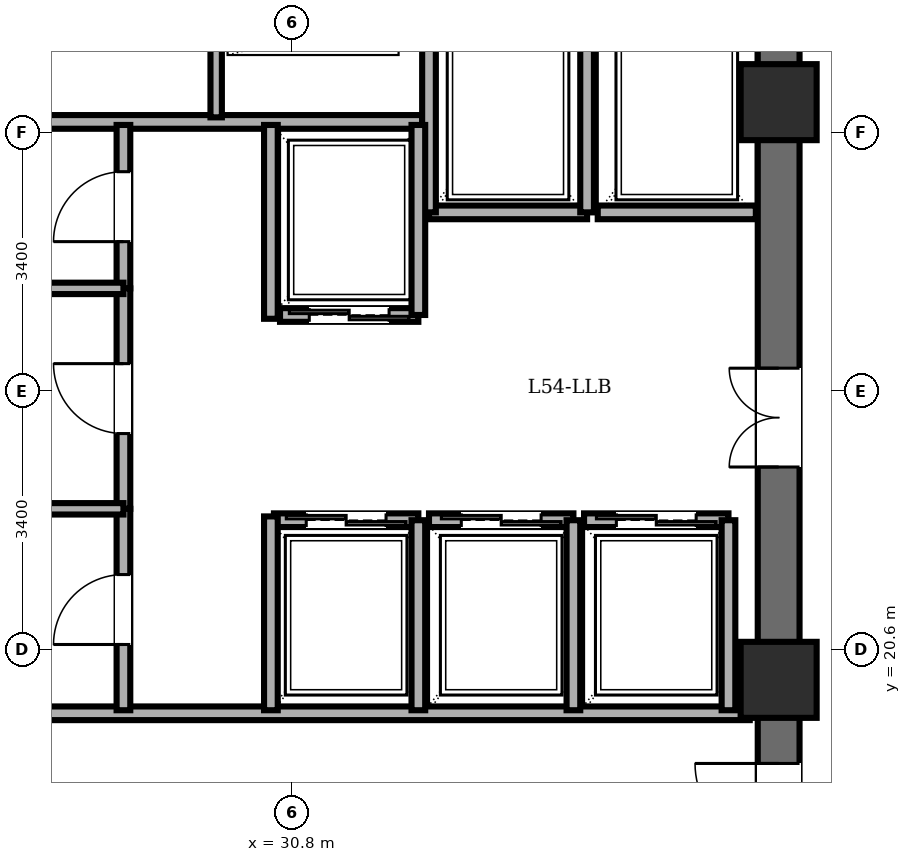
"""IFC4 building model, lengths in metres.
Left out: names, types, materials, properties, quantities, classifications, styles, units other than length and angle.
Written with IfcOpenShell. Run it as: python <this file> out.ifc"""

import sys

from ifc_helpers import new_model, si_unit, direction, frame, frame_2d, origin, origin_2d, place, context, subcontext, project, spatial, rectangle, extrude, element, fill, save


model = new_model("IFC4")
c1 = context("Model", 3, precision=1e-05, world=origin(), true_north=direction((0.0, 1.0)))
c2 = subcontext(c1, "Body", "Model", "MODEL_VIEW")
j1 = project(units=[si_unit("LENGTHUNIT", "METRE"), si_unit("PLANEANGLEUNIT", "RADIAN")], contexts=[c1])
p1 = place(None, origin())
s1 = spatial("IfcSite", under=j1, at=p1, CompositionType="ELEMENT")
p2 = place(p1, origin())
s2 = spatial("IfcBuilding", under=s1, at=p2, CompositionType="ELEMENT")
p3 = place(p2, frame((0.0, 0.0, 208.5)))
s3 = spatial("IfcBuildingStorey", under=s2, at=p3, CompositionType="ELEMENT", Elevation=208.5)
for number, where, z_axis, x_axis in (
    (1, (37.2, 20.2, 0.0), (0.0, 0.0, 1.0), (1.0, 0.0, 0.0)),
    (2, (37.2, 27.8, 0.0), (0.0, 0.0, 1.0), (1.0, 0.0, 0.0)),
):
    element("IfcColumn", number, at=place(p3, frame(where, z_axis=z_axis, x_axis=x_axis)), inside=s3, PredefinedType="COLUMN", context=c2, shape_type="SweptSolid", body=[
        extrude(rectangle(XDim=1.0, YDim=1.0, at=origin_2d()), origin(), (0.0, 0.0, 1.0), 3.6),
    ])
p4 = place(p3, frame((37.2, 14.4, 0.0), z_axis=(0.0, 0.0, 1.0), x_axis=(0.0, 1.0, 0.0)))
e3 = element("IfcWall", 3, at=p4, inside=s3, PredefinedType="SHEAR", context=c2, shape_type="SweptSolid", body=[
    extrude(rectangle(XDim=19.2, YDim=0.55, at=frame_2d((9.6, 0.0))), origin(), (0.0, 0.0, 1.0), 3.4),
])
p5 = place(p4, frame((15.8, 0.0, 0.0)))
e4 = element("IfcOpeningElement", 4, at=p5, cuts=e3, PredefinedType="OPENING", context=c2, shape_type="SweptSolid", body=[
    extrude(rectangle(XDim=1.15, YDim=2.15, at=frame_2d((0.575, 1.075))), frame((0.0, 0.285, 0.0), z_axis=(0.0, -1.0, 0.0), x_axis=(1.0, 0.0, 0.0)), (0.0, 0.0, 1.0), 0.57),
])
p6 = place(p4, frame((3.6, 0.0, 0.0)))
e5 = element("IfcOpeningElement", 5, at=p6, cuts=e3, PredefinedType="OPENING", context=c2, shape_type="SweptSolid", body=[
    extrude(rectangle(XDim=1.1, YDim=2.15, at=frame_2d((0.55, 1.075))), frame((0.0, 0.285, 0.0), z_axis=(0.0, -1.0, 0.0), x_axis=(1.0, 0.0, 0.0)), (0.0, 0.0, 1.0), 0.57),
])
p7 = place(p4, frame((8.6, 0.0, 0.0)))
e6 = element("IfcOpeningElement", 6, at=p7, cuts=e3, PredefinedType="OPENING", context=c2, shape_type="SweptSolid", body=[
    extrude(rectangle(XDim=1.3, YDim=2.2, at=frame_2d((0.65, 1.1))), frame((0.0, 0.285, 0.0), z_axis=(0.0, -1.0, 0.0), x_axis=(1.0, 0.0, 0.0)), (0.0, 0.0, 1.0), 0.57),
])
p8 = place(p3, frame((21.95, 27.54, 0.0), z_axis=(0.0, 0.0, 1.0), x_axis=(1.0, 0.0, 0.0)))
e7 = element("IfcWall", 7, at=p8, inside=s3, PredefinedType="PARTITIONING", context=c2, shape_type="SweptSolid", body=[
    extrude(rectangle(XDim=10.56, YDim=0.18, at=frame_2d((5.28, 0.0))), origin(), (0.0, 0.0, 1.0), 3.4),
])
p9 = place(p3, frame((29.8, 27.6, 0.0), z_axis=(0.0, 0.0, 1.0), x_axis=(0.0, 1.0, 0.0)))
e8 = element("IfcWall", 8, at=p9, inside=s3, PredefinedType="PARTITIONING", context=c2, shape_type="SweptSolid", body=[
    extrude(rectangle(XDim=1.52, YDim=0.15, at=frame_2d((0.76, 0.0))), origin(), (0.0, 0.0, 1.0), 3.4),
])
p10 = place(p3, frame((21.95, 19.76, 0.0), z_axis=(0.0, 0.0, 1.0), x_axis=(1.0, 0.0, 0.0)))
e9 = element("IfcWall", 9, at=p10, inside=s3, PredefinedType="PARTITIONING", context=c2, shape_type="SweptSolid", body=[
    extrude(rectangle(XDim=14.87, YDim=0.18, at=frame_2d((7.435, 0.0))), origin(), (0.0, 0.0, 1.0), 3.4),
])
p11 = place(p3, frame((34.68, 26.35, 0.0), z_axis=(0.0, 0.0, 1.0), x_axis=(-1.0, 0.0, 0.0)))
e10 = element("IfcWall", 10, at=p11, inside=s3, PredefinedType="PARTITIONING", context=c2, shape_type="SweptSolid", body=[
    extrude(rectangle(XDim=2.08, YDim=0.18, at=frame_2d((1.04, 0.0))), origin(), (0.0, 0.0, 1.0), 3.4),
])
for number, where, z_axis, x_axis in (
    (11, (34.68, 26.35, 0.0), (0.0, 0.0, 1.0), (0.0, 1.0, 0.0)),
    (12, (32.6, 29.08, 0.0), (0.0, 0.0, 1.0), (0.0, -1.0, 0.0)),
):
    element("IfcWall", number, at=place(p3, frame(where, z_axis=z_axis, x_axis=x_axis)), inside=s3, PredefinedType="PARTITIONING", context=c2, shape_type="SweptSolid", body=[
        extrude(rectangle(XDim=2.73, YDim=0.18, at=frame_2d((1.365, 0.0))), origin(), (0.0, 0.0, 1.0), 3.4),
    ])
p12 = place(p3, frame((36.9, 26.35, 0.0), z_axis=(0.0, 0.0, 1.0), x_axis=(-1.0, 0.0, 0.0)))
e13 = element("IfcWall", 13, at=p12, inside=s3, PredefinedType="PARTITIONING", context=c2, shape_type="SweptSolid", body=[
    extrude(rectangle(XDim=2.08, YDim=0.18, at=frame_2d((1.04, 0.0))), origin(), (0.0, 0.0, 1.0), 3.4),
])
p13 = place(p3, frame((32.46, 25.0, 0.0), z_axis=(0.0, 0.0, 1.0), x_axis=(-1.0, 0.0, 0.0)))
e14 = element("IfcWall", 14, at=p13, inside=s3, PredefinedType="PARTITIONING", context=c2, shape_type="SweptSolid", body=[
    extrude(rectangle(XDim=1.82, YDim=0.18, at=frame_2d((0.91, 0.0))), origin(), (0.0, 0.0, 1.0), 3.4),
])
p14 = place(p13, frame((0.385, 0.0, 0.0)))
e15 = element("IfcOpeningElement", 15, at=p14, cuts=e14, PredefinedType="OPENING", context=c2, shape_type="SweptSolid", body=[
    extrude(rectangle(XDim=1.05, YDim=2.2, at=frame_2d((0.525, 1.1))), frame((0.0, 0.1, 0.0), z_axis=(0.0, -1.0, 0.0), x_axis=(1.0, 0.0, 0.0)), (0.0, 0.0, 1.0), 0.2),
])
p15 = place(p3, frame((32.46, 25.0, 0.0), z_axis=(0.0, 0.0, 1.0), x_axis=(0.0, 1.0, 0.0)))
e16 = element("IfcWall", 16, at=p15, inside=s3, PredefinedType="PARTITIONING", context=c2, shape_type="SweptSolid", body=[
    extrude(rectangle(XDim=2.5, YDim=0.18, at=frame_2d((1.25, 0.0))), origin(), (0.0, 0.0, 1.0), 3.4),
])
p16 = place(p3, frame((30.56, 22.3, 0.0), z_axis=(0.0, 0.0, 1.0), x_axis=(1.0, 0.0, 0.0)))
e17 = element("IfcWall", 17, at=p16, inside=s3, PredefinedType="PARTITIONING", context=c2, shape_type="SweptSolid", body=[
    extrude(rectangle(XDim=1.9, YDim=0.18, at=frame_2d((0.95, 0.0))), origin(), (0.0, 0.0, 1.0), 3.4),
])
p17 = place(p16, frame((0.425, 0.0, 0.0)))
e18 = element("IfcOpeningElement", 18, at=p17, cuts=e17, PredefinedType="OPENING", context=c2, shape_type="SweptSolid", body=[
    extrude(rectangle(XDim=1.05, YDim=2.2, at=frame_2d((0.525, 1.1))), frame((0.0, 0.1, 0.0), z_axis=(0.0, -1.0, 0.0), x_axis=(1.0, 0.0, 0.0)), (0.0, 0.0, 1.0), 0.2),
])
p18 = place(p3, frame((32.46, 19.8, 0.0), z_axis=(0.0, 0.0, 1.0), x_axis=(0.0, 1.0, 0.0)))
e19 = element("IfcWall", 19, at=p18, inside=s3, PredefinedType="PARTITIONING", context=c2, shape_type="SweptSolid", body=[
    extrude(rectangle(XDim=2.5, YDim=0.18, at=frame_2d((1.25, 0.0))), origin(), (0.0, 0.0, 1.0), 3.4),
])
p19 = place(p3, frame((32.6, 22.3, 0.0), z_axis=(0.0, 0.0, 1.0), x_axis=(1.0, 0.0, 0.0)))
e20 = element("IfcWall", 20, at=p19, inside=s3, PredefinedType="PARTITIONING", context=c2, shape_type="SweptSolid", body=[
    extrude(rectangle(XDim=1.9, YDim=0.18, at=frame_2d((0.95, 0.0))), origin(), (0.0, 0.0, 1.0), 3.4),
])
p20 = place(p19, frame((0.425, 0.0, 0.0)))
e21 = element("IfcOpeningElement", 21, at=p20, cuts=e20, PredefinedType="OPENING", context=c2, shape_type="SweptSolid", body=[
    extrude(rectangle(XDim=1.05, YDim=2.2, at=frame_2d((0.525, 1.1))), frame((0.0, 0.1, 0.0), z_axis=(0.0, -1.0, 0.0), x_axis=(1.0, 0.0, 0.0)), (0.0, 0.0, 1.0), 0.2),
])
p21 = place(p3, frame((34.5, 19.8, 0.0), z_axis=(0.0, 0.0, 1.0), x_axis=(0.0, 1.0, 0.0)))
e22 = element("IfcWall", 22, at=p21, inside=s3, PredefinedType="PARTITIONING", context=c2, shape_type="SweptSolid", body=[
    extrude(rectangle(XDim=2.5, YDim=0.18, at=frame_2d((1.25, 0.0))), origin(), (0.0, 0.0, 1.0), 3.4),
])
p22 = place(p3, frame((34.64, 22.3, 0.0), z_axis=(0.0, 0.0, 1.0), x_axis=(1.0, 0.0, 0.0)))
e23 = element("IfcWall", 23, at=p22, inside=s3, PredefinedType="PARTITIONING", context=c2, shape_type="SweptSolid", body=[
    extrude(rectangle(XDim=1.9, YDim=0.18, at=frame_2d((0.95, 0.0))), origin(), (0.0, 0.0, 1.0), 3.4),
])
p23 = place(p22, frame((0.425, 0.0, 0.0)))
e24 = element("IfcOpeningElement", 24, at=p23, cuts=e23, PredefinedType="OPENING", context=c2, shape_type="SweptSolid", body=[
    extrude(rectangle(XDim=1.05, YDim=2.2, at=frame_2d((0.525, 1.1))), frame((0.0, 0.1, 0.0), z_axis=(0.0, -1.0, 0.0), x_axis=(1.0, 0.0, 0.0)), (0.0, 0.0, 1.0), 0.2),
])
p24 = place(p3, frame((36.54, 19.8, 0.0), z_axis=(0.0, 0.0, 1.0), x_axis=(0.0, 1.0, 0.0)))
e25 = element("IfcWall", 25, at=p24, inside=s3, PredefinedType="PARTITIONING", context=c2, shape_type="SweptSolid", body=[
    extrude(rectangle(XDim=2.5, YDim=0.18, at=frame_2d((1.25, 0.0))), origin(), (0.0, 0.0, 1.0), 3.4),
])
for number, where, z_axis, x_axis in (
    (26, (30.52, 24.95, 0.0), (0.0, 0.0, 1.0), (0.0, 1.0, 0.0)),
    (27, (30.52, 19.8, 0.0), (0.0, 0.0, 1.0), (0.0, 1.0, 0.0)),
):
    element("IfcWall", number, at=place(p3, frame(where, z_axis=z_axis, x_axis=x_axis)), inside=s3, PredefinedType="PARTITIONING", context=c2, shape_type="SweptSolid", body=[
        extrude(rectangle(XDim=2.55, YDim=0.18, at=frame_2d((1.275, 0.0))), origin(), (0.0, 0.0, 1.0), 3.4),
    ])
p25 = place(p3, frame((28.58, 25.35, 0.0), z_axis=(0.0, 0.0, 1.0), x_axis=(0.0, 1.0, 0.0)))
e28 = element("IfcWall", 28, at=p25, inside=s3, PredefinedType="PARTITIONING", context=c2, shape_type="SweptSolid", body=[
    extrude(rectangle(XDim=2.15, YDim=0.18, at=frame_2d((1.075, 0.0))), origin(), (0.0, 0.0, 1.0), 3.4),
])
p26 = place(p25, frame((0.615, 0.0, 0.0)))
e29 = element("IfcOpeningElement", 29, at=p26, cuts=e28, PredefinedType="OPENING", context=c2, shape_type="SweptSolid", body=[
    extrude(rectangle(XDim=0.92, YDim=2.1, at=frame_2d((0.46, 1.05))), frame((0.0, 0.1, 0.0), z_axis=(0.0, -1.0, 0.0), x_axis=(1.0, 0.0, 0.0)), (0.0, 0.0, 1.0), 0.2),
])
p27 = place(p3, frame((28.58, 22.45, 0.0), z_axis=(0.0, 0.0, 1.0), x_axis=(0.0, 1.0, 0.0)))
e30 = element("IfcWall", 30, at=p27, inside=s3, PredefinedType="PARTITIONING", context=c2, shape_type="SweptSolid", body=[
    extrude(rectangle(XDim=2.9, YDim=0.18, at=frame_2d((1.45, 0.0))), origin(), (0.0, 0.0, 1.0), 3.4),
])
p28 = place(p27, frame((0.99, 0.0, 0.0)))
e31 = element("IfcOpeningElement", 31, at=p28, cuts=e30, PredefinedType="OPENING", context=c2, shape_type="SweptSolid", body=[
    extrude(rectangle(XDim=0.92, YDim=2.1, at=frame_2d((0.46, 1.05))), frame((0.0, 0.1, 0.0), z_axis=(0.0, -1.0, 0.0), x_axis=(1.0, 0.0, 0.0)), (0.0, 0.0, 1.0), 0.2),
])
p29 = place(p3, frame((28.58, 19.8, 0.0), z_axis=(0.0, 0.0, 1.0), x_axis=(0.0, 1.0, 0.0)))
e32 = element("IfcWall", 32, at=p29, inside=s3, PredefinedType="PARTITIONING", context=c2, shape_type="SweptSolid", body=[
    extrude(rectangle(XDim=2.65, YDim=0.18, at=frame_2d((1.325, 0.0))), origin(), (0.0, 0.0, 1.0), 3.4),
])
p30 = place(p29, frame((0.865, 0.0, 0.0)))
e33 = element("IfcOpeningElement", 33, at=p30, cuts=e32, PredefinedType="OPENING", context=c2, shape_type="SweptSolid", body=[
    extrude(rectangle(XDim=0.92, YDim=2.1, at=frame_2d((0.46, 1.05))), frame((0.0, 0.1, 0.0), z_axis=(0.0, -1.0, 0.0), x_axis=(1.0, 0.0, 0.0)), (0.0, 0.0, 1.0), 0.2),
])
for number, where, z_axis, x_axis in (
    (34, (21.95, 25.35, 0.0), (0.0, 0.0, 1.0), (1.0, 0.0, 0.0)),
    (35, (21.95, 22.45, 0.0), (0.0, 0.0, 1.0), (1.0, 0.0, 0.0)),
):
    element("IfcWall", number, at=place(p3, frame(where, z_axis=z_axis, x_axis=x_axis)), inside=s3, PredefinedType="PARTITIONING", context=c2, shape_type="SweptSolid", body=[
        extrude(rectangle(XDim=6.63, YDim=0.15, at=frame_2d((3.315, 0.0))), origin(), (0.0, 0.0, 1.0), 3.4),
    ])
p31 = place(p6, origin())
e36 = element("IfcDoor", 36, at=p31, inside=s3, OperationType="SINGLE_SWING_RIGHT", PredefinedType="DOOR", context=c2, shape_type="SweptSolid", body=[
    extrude(rectangle(XDim=1.1, YDim=2.15, at=frame_2d((0.55, 1.075))), frame((0.0, 0.025, 0.0), z_axis=(0.0, -1.0, 0.0), x_axis=(1.0, 0.0, 0.0)), (0.0, 0.0, 1.0), 0.05),
])
fill(e5, e36)
p32 = place(p14, origin())
e37 = element("IfcDoor", 37, at=p32, inside=s3, OperationType="DOUBLE_DOOR_SLIDING", PredefinedType="DOOR", context=c2, shape_type="SweptSolid", body=[
    extrude(rectangle(XDim=1.05, YDim=2.2, at=frame_2d((0.525, 1.1))), frame((0.0, 0.025, 0.0), z_axis=(0.0, -1.0, 0.0), x_axis=(1.0, 0.0, 0.0)), (0.0, 0.0, 1.0), 0.05),
])
fill(e15, e37)
p33 = place(p17, origin())
e38 = element("IfcDoor", 38, at=p33, inside=s3, OperationType="DOUBLE_DOOR_SLIDING", PredefinedType="DOOR", context=c2, shape_type="SweptSolid", body=[
    extrude(rectangle(XDim=1.05, YDim=2.2, at=frame_2d((0.525, 1.1))), frame((0.0, 0.025, 0.0), z_axis=(0.0, -1.0, 0.0), x_axis=(1.0, 0.0, 0.0)), (0.0, 0.0, 1.0), 0.05),
])
fill(e18, e38)
p34 = place(p20, origin())
e39 = element("IfcDoor", 39, at=p34, inside=s3, OperationType="DOUBLE_DOOR_SLIDING", PredefinedType="DOOR", context=c2, shape_type="SweptSolid", body=[
    extrude(rectangle(XDim=1.05, YDim=2.2, at=frame_2d((0.525, 1.1))), frame((0.0, 0.025, 0.0), z_axis=(0.0, -1.0, 0.0), x_axis=(1.0, 0.0, 0.0)), (0.0, 0.0, 1.0), 0.05),
])
fill(e21, e39)
p35 = place(p23, origin())
e40 = element("IfcDoor", 40, at=p35, inside=s3, OperationType="DOUBLE_DOOR_SLIDING", PredefinedType="DOOR", context=c2, shape_type="SweptSolid", body=[
    extrude(rectangle(XDim=1.05, YDim=2.2, at=frame_2d((0.525, 1.1))), frame((0.0, 0.025, 0.0), z_axis=(0.0, -1.0, 0.0), x_axis=(1.0, 0.0, 0.0)), (0.0, 0.0, 1.0), 0.05),
])
fill(e24, e40)
p36 = place(p26, origin())
e41 = element("IfcDoor", 41, at=p36, inside=s3, OperationType="SINGLE_SWING_LEFT", PredefinedType="DOOR", context=c2, shape_type="SweptSolid", body=[
    extrude(rectangle(XDim=0.92, YDim=2.1, at=frame_2d((0.46, 1.05))), frame((0.0, 0.025, 0.0), z_axis=(0.0, -1.0, 0.0), x_axis=(1.0, 0.0, 0.0)), (0.0, 0.0, 1.0), 0.05),
])
fill(e29, e41)
p37 = place(p28, origin())
e42 = element("IfcDoor", 42, at=p37, inside=s3, OperationType="SINGLE_SWING_RIGHT", PredefinedType="DOOR", context=c2, shape_type="SweptSolid", body=[
    extrude(rectangle(XDim=0.92, YDim=2.1, at=frame_2d((0.46, 1.05))), frame((0.0, 0.025, 0.0), z_axis=(0.0, -1.0, 0.0), x_axis=(1.0, 0.0, 0.0)), (0.0, 0.0, 1.0), 0.05),
])
fill(e31, e42)
p38 = place(p30, origin())
e43 = element("IfcDoor", 43, at=p38, inside=s3, OperationType="SINGLE_SWING_LEFT", PredefinedType="DOOR", context=c2, shape_type="SweptSolid", body=[
    extrude(rectangle(XDim=0.92, YDim=2.1, at=frame_2d((0.46, 1.05))), frame((0.0, 0.025, 0.0), z_axis=(0.0, -1.0, 0.0), x_axis=(1.0, 0.0, 0.0)), (0.0, 0.0, 1.0), 0.05),
])
fill(e33, e43)
p39 = place(p7, origin())
e44 = element("IfcDoor", 44, at=p39, inside=s3, OperationType="DOUBLE_DOOR_SINGLE_SWING", PredefinedType="DOOR", context=c2, shape_type="SweptSolid", body=[
    extrude(rectangle(XDim=1.3, YDim=2.2, at=frame_2d((0.65, 1.1))), frame((0.0, 0.025, 0.0), z_axis=(0.0, -1.0, 0.0), x_axis=(1.0, 0.0, 0.0)), (0.0, 0.0, 1.0), 0.05),
])
fill(e6, e44)
save(model, sys.argv[1])
